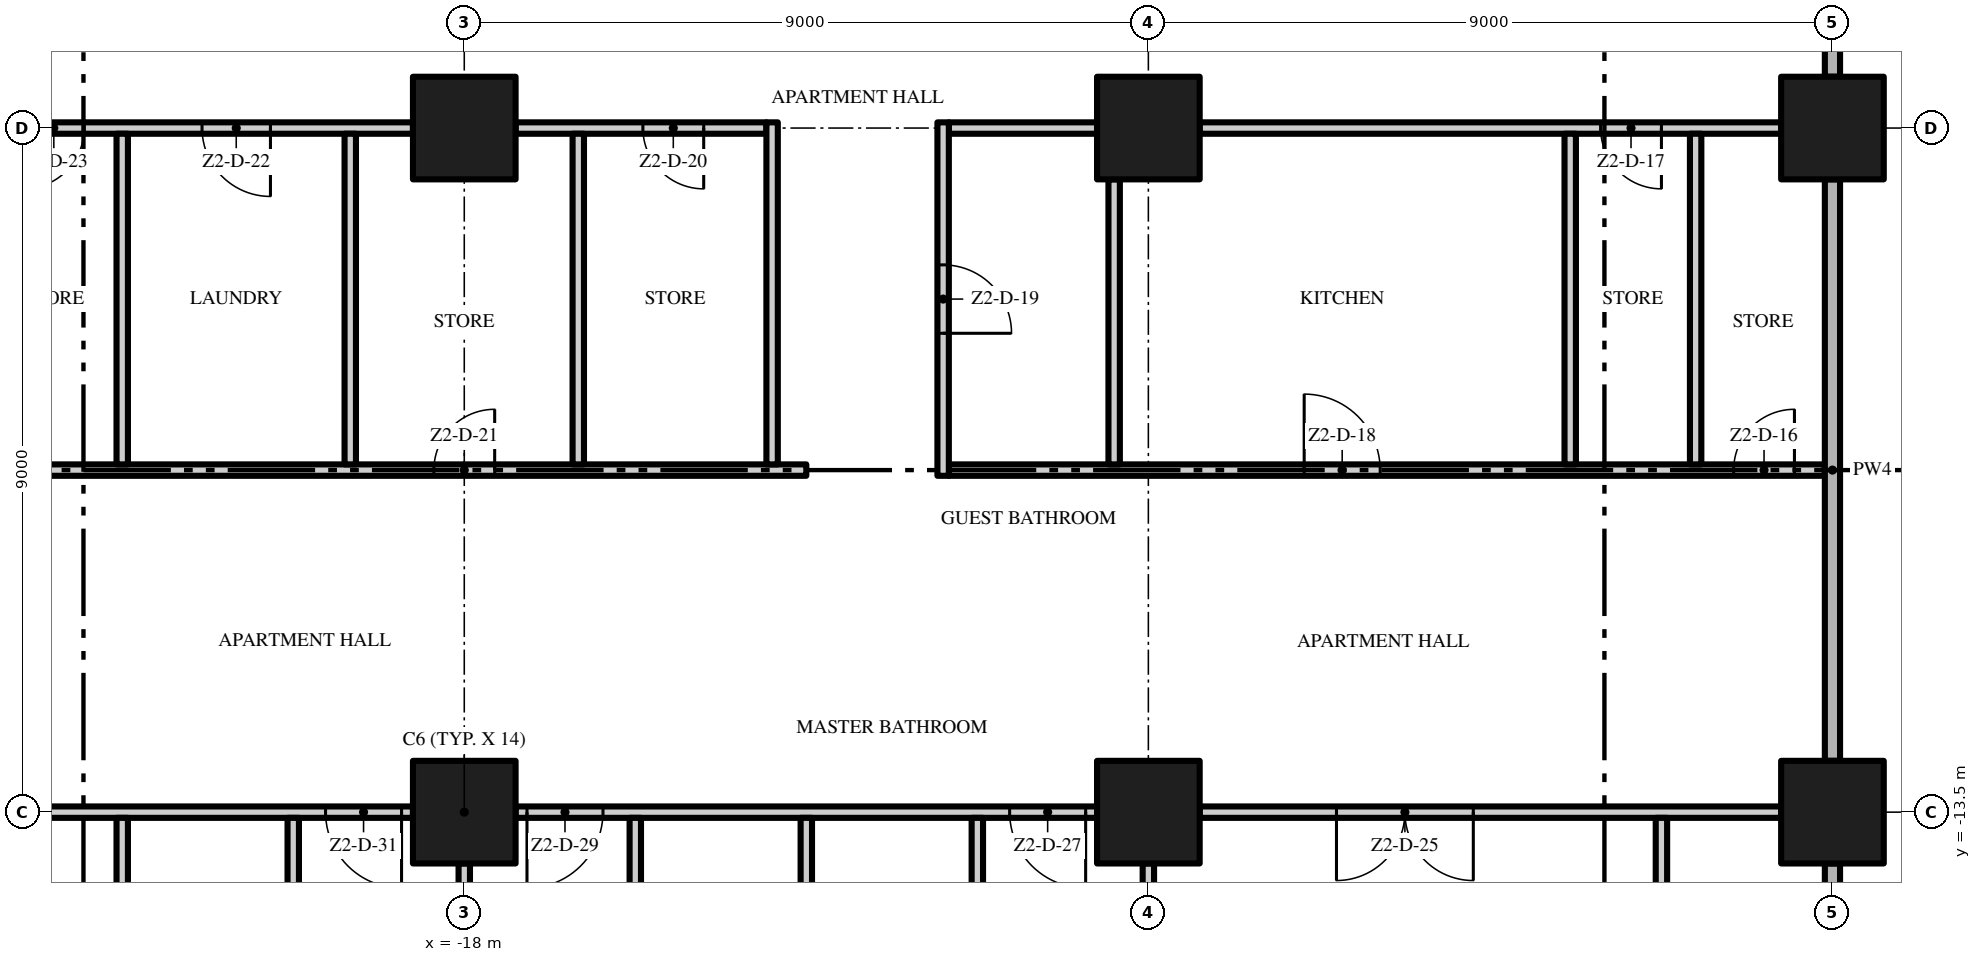
"""IFC4 building model, lengths in metres.
Left out: names, types, materials, properties, quantities, classifications, styles, units other than length and angle.
Written with IfcOpenShell. Run it as: python <this file> out.ifc"""

import sys

from ifc_helpers import new_model, si_unit, direction, frame, frame_2d, origin, origin_2d, place, context, subcontext, project, spatial, rectangle, extrude, element, fill, save


model = new_model("IFC4")
c1 = context("Model", 3, precision=1e-05, world=origin(), true_north=direction((0.0, 1.0)))
c2 = subcontext(c1, "Body", "Model", "MODEL_VIEW")
j1 = project(units=[si_unit("LENGTHUNIT", "METRE"), si_unit("PLANEANGLEUNIT", "RADIAN")], contexts=[c1])
p1 = place(None, origin())
s1 = spatial("IfcSite", under=j1, at=p1, CompositionType="ELEMENT")
p2 = place(p1, origin())
s2 = spatial("IfcBuilding", under=s1, at=p2, CompositionType="ELEMENT")
p3 = place(p2, frame((0.0, 0.0, 111.2)))
s3 = spatial("IfcBuildingStorey", under=s2, at=p3, CompositionType="ELEMENT", Elevation=111.2)
for number, where, z_axis, x_axis in (
    (1, (-18.0, -13.5, 0.0), (0.0, 0.0, 1.0), (1.0, 0.0, 0.0)),
    (2, (-18.0, -4.5, 0.0), (0.0, 0.0, 1.0), (1.0, 0.0, 0.0)),
    (3, (-9.0, -13.5, 0.0), (0.0, 0.0, 1.0), (1.0, 0.0, 0.0)),
    (4, (-9.0, -4.5, 0.0), (0.0, 0.0, 1.0), (1.0, 0.0, 0.0)),
    (5, (0.0, -13.5, 0.0), (0.0, 0.0, 1.0), (1.0, 0.0, 0.0)),
    (6, (0.0, -4.5, 0.0), (0.0, 0.0, 1.0), (1.0, 0.0, 0.0)),
):
    element("IfcColumn", number, at=place(p3, frame(where, z_axis=z_axis, x_axis=x_axis)), inside=s3, PredefinedType="COLUMN", context=c2, shape_type="SweptSolid", body=[
        extrude(rectangle(XDim=1.35, YDim=1.35, at=origin_2d()), origin(), (0.0, 0.0, 1.0), 3.5),
    ])
p4 = place(p3, frame((-18.675, -13.5, 0.0), z_axis=(0.0, 0.0, 1.0), x_axis=(-1.0, 0.0, 0.0)))
e7 = element("IfcWall", 7, at=p4, inside=s3, PredefinedType="PARTITIONING", context=c2, shape_type="SweptSolid", body=[
    extrude(rectangle(XDim=7.075, YDim=0.15, at=frame_2d((3.538, 0.0))), origin(), (0.0, 0.0, 1.0), 3.5),
])
p5 = place(p4, frame((0.15, 0.0, 0.0)))
e8 = element("IfcOpeningElement", 8, at=p5, cuts=e7, PredefinedType="OPENING", context=c2, shape_type="SweptSolid", body=[
    extrude(rectangle(XDim=1.0, YDim=2.4, at=frame_2d((0.5, 1.2))), frame((0.0, 0.085, 0.0), z_axis=(0.0, -1.0, 0.0), x_axis=(1.0, 0.0, 0.0)), (0.0, 0.0, 1.0), 0.17),
])
p6 = place(p4, frame((5.325, 0.0, 0.0)))
e9 = element("IfcOpeningElement", 9, at=p6, cuts=e7, PredefinedType="OPENING", context=c2, shape_type="SweptSolid", body=[
    extrude(rectangle(XDim=1.5, YDim=2.4, at=frame_2d((0.75, 1.2))), frame((0.0, 0.085, 0.0), z_axis=(0.0, -1.0, 0.0), x_axis=(1.0, 0.0, 0.0)), (0.0, 0.0, 1.0), 0.17),
])
p7 = place(p3, frame((-9.675, -13.5, 0.0), z_axis=(0.0, 0.0, 1.0), x_axis=(-1.0, 0.0, 0.0)))
e10 = element("IfcWall", 10, at=p7, inside=s3, PredefinedType="PARTITIONING", context=c2, shape_type="SweptSolid", body=[
    extrude(rectangle(XDim=7.65, YDim=0.15, at=frame_2d((3.825, 0.0))), origin(), (0.0, 0.0, 1.0), 3.5),
])
p8 = place(p7, frame((0.15, 0.0, 0.0)))
e11 = element("IfcOpeningElement", 11, at=p8, cuts=e10, PredefinedType="OPENING", context=c2, shape_type="SweptSolid", body=[
    extrude(rectangle(XDim=1.0, YDim=2.4, at=frame_2d((0.5, 1.2))), frame((0.0, 0.085, 0.0), z_axis=(0.0, -1.0, 0.0), x_axis=(1.0, 0.0, 0.0)), (0.0, 0.0, 1.0), 0.17),
])
p9 = place(p7, frame((6.5, 0.0, 0.0)))
e12 = element("IfcOpeningElement", 12, at=p9, cuts=e10, PredefinedType="OPENING", context=c2, shape_type="SweptSolid", body=[
    extrude(rectangle(XDim=1.0, YDim=2.4, at=frame_2d((0.5, 1.2))), frame((0.0, 0.085, 0.0), z_axis=(0.0, -1.0, 0.0), x_axis=(1.0, 0.0, 0.0)), (0.0, 0.0, 1.0), 0.17),
])
p10 = place(p3, frame((-0.675, -13.5, 0.0), z_axis=(0.0, 0.0, 1.0), x_axis=(-1.0, 0.0, 0.0)))
e13 = element("IfcWall", 13, at=p10, inside=s3, PredefinedType="PARTITIONING", context=c2, shape_type="SweptSolid", body=[
    extrude(rectangle(XDim=7.65, YDim=0.15, at=frame_2d((3.825, 0.0))), origin(), (0.0, 0.0, 1.0), 3.5),
])
p11 = place(p10, frame((4.05, 0.0, 0.0)))
e14 = element("IfcOpeningElement", 14, at=p11, cuts=e13, PredefinedType="OPENING", context=c2, shape_type="SweptSolid", body=[
    extrude(rectangle(XDim=1.8, YDim=2.4, at=frame_2d((0.9, 1.2))), frame((0.0, 0.085, 0.0), z_axis=(0.0, -1.0, 0.0), x_axis=(1.0, 0.0, 0.0)), (0.0, 0.0, 1.0), 0.17),
])
p12 = place(p3, frame((-26.7, -9.0, 0.0), z_axis=(0.0, 0.0, 1.0), x_axis=(1.0, 0.0, 0.0)))
e15 = element("IfcWall", 15, at=p12, inside=s3, PredefinedType="PARTITIONING", context=c2, shape_type="SweptSolid", body=[
    extrude(rectangle(XDim=13.2, YDim=0.15, at=frame_2d((6.6, 0.0))), origin(), (0.0, 0.0, 1.0), 3.5),
])
p13 = place(p12, frame((8.3, 0.0, 0.0)))
e16 = element("IfcOpeningElement", 16, at=p13, cuts=e15, PredefinedType="OPENING", context=c2, shape_type="SweptSolid", body=[
    extrude(rectangle(XDim=0.8, YDim=2.0, at=frame_2d((0.4, 1.0))), frame((0.0, 0.085, 0.0), z_axis=(0.0, -1.0, 0.0), x_axis=(1.0, 0.0, 0.0)), (0.0, 0.0, 1.0), 0.17),
])
p14 = place(p3, frame((-11.625, -9.0, 0.0), z_axis=(0.0, 0.0, 1.0), x_axis=(1.0, 0.0, 0.0)))
e17 = element("IfcWall", 17, at=p14, inside=s3, PredefinedType="PARTITIONING", context=c2, shape_type="SweptSolid", body=[
    extrude(rectangle(XDim=11.525, YDim=0.15, at=frame_2d((5.763, 0.0))), origin(), (0.0, 0.0, 1.0), 3.5),
])
p15 = place(p14, frame((10.325, 0.0, 0.0)))
e18 = element("IfcOpeningElement", 18, at=p15, cuts=e17, PredefinedType="OPENING", context=c2, shape_type="SweptSolid", body=[
    extrude(rectangle(XDim=0.8, YDim=2.0, at=frame_2d((0.4, 1.0))), frame((0.0, 0.085, 0.0), z_axis=(0.0, -1.0, 0.0), x_axis=(1.0, 0.0, 0.0)), (0.0, 0.0, 1.0), 0.17),
])
p16 = place(p14, frame((4.675, 0.0, 0.0)))
e19 = element("IfcOpeningElement", 19, at=p16, cuts=e17, PredefinedType="OPENING", context=c2, shape_type="SweptSolid", body=[
    extrude(rectangle(XDim=1.0, YDim=2.4, at=frame_2d((0.5, 1.2))), frame((0.0, 0.085, 0.0), z_axis=(0.0, -1.0, 0.0), x_axis=(1.0, 0.0, 0.0)), (0.0, 0.0, 1.0), 0.17),
])
p17 = place(p3, frame((-18.675, -4.5, 0.0), z_axis=(0.0, 0.0, 1.0), x_axis=(-1.0, 0.0, 0.0)))
e20 = element("IfcWall", 20, at=p17, inside=s3, PredefinedType="PARTITIONING", context=c2, shape_type="SweptSolid", body=[
    extrude(rectangle(XDim=7.075, YDim=0.15, at=frame_2d((3.538, 0.0))), origin(), (0.0, 0.0, 1.0), 3.5),
])
p18 = place(p17, frame((1.875, 0.0, 0.0)))
e21 = element("IfcOpeningElement", 21, at=p18, cuts=e20, PredefinedType="OPENING", context=c2, shape_type="SweptSolid", body=[
    extrude(rectangle(XDim=0.9, YDim=2.1, at=frame_2d((0.45, 1.05))), frame((0.0, 0.085, 0.0), z_axis=(0.0, -1.0, 0.0), x_axis=(1.0, 0.0, 0.0)), (0.0, 0.0, 1.0), 0.17),
])
p19 = place(p17, frame((4.325, 0.0, 0.0)))
e22 = element("IfcOpeningElement", 22, at=p19, cuts=e20, PredefinedType="OPENING", context=c2, shape_type="SweptSolid", body=[
    extrude(rectangle(XDim=0.8, YDim=2.0, at=frame_2d((0.4, 1.0))), frame((0.0, 0.085, 0.0), z_axis=(0.0, -1.0, 0.0), x_axis=(1.0, 0.0, 0.0)), (0.0, 0.0, 1.0), 0.17),
])
p20 = place(p17, frame((6.125, 0.0, 0.0)))
e23 = element("IfcOpeningElement", 23, at=p20, cuts=e20, PredefinedType="OPENING", context=c2, shape_type="SweptSolid", body=[
    extrude(rectangle(XDim=0.8, YDim=2.0, at=frame_2d((0.4, 1.0))), frame((0.0, 0.085, 0.0), z_axis=(0.0, -1.0, 0.0), x_axis=(1.0, 0.0, 0.0)), (0.0, 0.0, 1.0), 0.17),
])
p21 = place(p3, frame((-14.025, -4.5, 0.0), z_axis=(0.0, 0.0, 1.0), x_axis=(-1.0, 0.0, 0.0)))
e24 = element("IfcWall", 24, at=p21, inside=s3, PredefinedType="PARTITIONING", context=c2, shape_type="SweptSolid", body=[
    extrude(rectangle(XDim=3.3, YDim=0.15, at=frame_2d((1.65, 0.0))), origin(), (0.0, 0.0, 1.0), 3.5),
])
p22 = place(p21, frame((0.825, 0.0, 0.0)))
e25 = element("IfcOpeningElement", 25, at=p22, cuts=e24, PredefinedType="OPENING", context=c2, shape_type="SweptSolid", body=[
    extrude(rectangle(XDim=0.8, YDim=2.0, at=frame_2d((0.4, 1.0))), frame((0.0, 0.085, 0.0), z_axis=(0.0, -1.0, 0.0), x_axis=(1.0, 0.0, 0.0)), (0.0, 0.0, 1.0), 0.17),
])
p23 = place(p3, frame((-11.625, -4.5, 0.0), z_axis=(0.0, 0.0, 1.0), x_axis=(1.0, 0.0, 0.0)))
e26 = element("IfcWall", 26, at=p23, inside=s3, PredefinedType="PARTITIONING", context=c2, shape_type="SweptSolid", body=[
    extrude(rectangle(XDim=1.95, YDim=0.15, at=frame_2d((0.975, 0.0))), origin(), (0.0, 0.0, 1.0), 3.5),
])
p24 = place(p3, frame((-0.675, -4.5, 0.0), z_axis=(0.0, 0.0, 1.0), x_axis=(-1.0, 0.0, 0.0)))
e27 = element("IfcWall", 27, at=p24, inside=s3, PredefinedType="PARTITIONING", context=c2, shape_type="SweptSolid", body=[
    extrude(rectangle(XDim=7.65, YDim=0.15, at=frame_2d((3.825, 0.0))), origin(), (0.0, 0.0, 1.0), 3.5),
])
p25 = place(p24, frame((1.575, 0.0, 0.0)))
e28 = element("IfcOpeningElement", 28, at=p25, cuts=e27, PredefinedType="OPENING", context=c2, shape_type="SweptSolid", body=[
    extrude(rectangle(XDim=0.8, YDim=2.0, at=frame_2d((0.4, 1.0))), frame((0.0, 0.085, 0.0), z_axis=(0.0, -1.0, 0.0), x_axis=(1.0, 0.0, 0.0)), (0.0, 0.0, 1.0), 0.17),
])
p26 = place(p3, frame((-22.5, -17.375, 0.0), z_axis=(0.0, 0.0, 1.0), x_axis=(0.0, 1.0, 0.0)))
e29 = element("IfcWall", 29, at=p26, inside=s3, PredefinedType="PARTITIONING", context=c2, shape_type="SweptSolid", body=[
    extrude(rectangle(XDim=3.8, YDim=0.15, at=frame_2d((1.9, 0.0))), origin(), (0.0, 0.0, 1.0), 3.5),
])
p27 = place(p3, frame((-22.5, -8.925, 0.0), z_axis=(0.0, 0.0, 1.0), x_axis=(0.0, 1.0, 0.0)))
e30 = element("IfcWall", 30, at=p27, inside=s3, PredefinedType="PARTITIONING", context=c2, shape_type="SweptSolid", body=[
    extrude(rectangle(XDim=4.35, YDim=0.15, at=frame_2d((2.175, 0.0))), origin(), (0.0, 0.0, 1.0), 3.5),
])
p28 = place(p3, frame((-20.25, -16.575, 0.0), z_axis=(0.0, 0.0, 1.0), x_axis=(0.0, 1.0, 0.0)))
e31 = element("IfcWall", 31, at=p28, inside=s3, PredefinedType="PARTITIONING", context=c2, shape_type="SweptSolid", body=[
    extrude(rectangle(XDim=3.0, YDim=0.15, at=frame_2d((1.5, 0.0))), origin(), (0.0, 0.0, 1.0), 3.5),
])
p29 = place(p3, frame((-19.5, -8.925, 0.0), z_axis=(0.0, 0.0, 1.0), x_axis=(0.0, 1.0, 0.0)))
e32 = element("IfcWall", 32, at=p29, inside=s3, PredefinedType="PARTITIONING", context=c2, shape_type="SweptSolid", body=[
    extrude(rectangle(XDim=4.35, YDim=0.15, at=frame_2d((2.175, 0.0))), origin(), (0.0, 0.0, 1.0), 3.5),
])
p30 = place(p3, frame((-18.0, -21.25, 0.0), z_axis=(0.0, 0.0, 1.0), x_axis=(0.0, 1.0, 0.0)))
e33 = element("IfcWall", 33, at=p30, inside=s3, PredefinedType="PARTITIONING", context=c2, shape_type="SweptSolid", body=[
    extrude(rectangle(XDim=7.075, YDim=0.15, at=frame_2d((3.538, 0.0))), origin(), (0.0, 0.0, 1.0), 3.5),
])
p31 = place(p3, frame((-16.5, -8.925, 0.0), z_axis=(0.0, 0.0, 1.0), x_axis=(0.0, 1.0, 0.0)))
e34 = element("IfcWall", 34, at=p31, inside=s3, PredefinedType="PARTITIONING", context=c2, shape_type="SweptSolid", body=[
    extrude(rectangle(XDim=4.35, YDim=0.15, at=frame_2d((2.175, 0.0))), origin(), (0.0, 0.0, 1.0), 3.5),
])
p32 = place(p3, frame((-15.75, -16.575, 0.0), z_axis=(0.0, 0.0, 1.0), x_axis=(0.0, 1.0, 0.0)))
e35 = element("IfcWall", 35, at=p32, inside=s3, PredefinedType="PARTITIONING", context=c2, shape_type="SweptSolid", body=[
    extrude(rectangle(XDim=3.0, YDim=0.15, at=frame_2d((1.5, 0.0))), origin(), (0.0, 0.0, 1.0), 3.5),
])
p33 = place(p3, frame((-13.95, -8.925, 0.0), z_axis=(0.0, 0.0, 1.0), x_axis=(0.0, 1.0, 0.0)))
e36 = element("IfcWall", 36, at=p33, inside=s3, PredefinedType="PARTITIONING", context=c2, shape_type="SweptSolid", body=[
    extrude(rectangle(XDim=4.5, YDim=0.15, at=frame_2d((2.25, 0.0))), origin(), (0.0, 0.0, 1.0), 3.5),
])
p34 = place(p3, frame((-13.5, -22.2, 0.0), z_axis=(0.0, 0.0, 1.0), x_axis=(0.0, 1.0, 0.0)))
e37 = element("IfcWall", 37, at=p34, inside=s3, PredefinedType="PARTITIONING", context=c2, shape_type="SweptSolid", body=[
    extrude(rectangle(XDim=8.625, YDim=0.15, at=frame_2d((4.312, 0.0))), origin(), (0.0, 0.0, 1.0), 3.5),
])
p35 = place(p3, frame((-11.7, -4.425, 0.0), z_axis=(0.0, 0.0, 1.0), x_axis=(0.0, -1.0, 0.0)))
e38 = element("IfcWall", 38, at=p35, inside=s3, PredefinedType="PARTITIONING", context=c2, shape_type="SweptSolid", body=[
    extrude(rectangle(XDim=4.65, YDim=0.15, at=frame_2d((2.325, 0.0))), origin(), (0.0, 0.0, 1.0), 3.5),
])
p36 = place(p35, frame((1.875, 0.0, 0.0)))
e39 = element("IfcOpeningElement", 39, at=p36, cuts=e38, PredefinedType="OPENING", context=c2, shape_type="SweptSolid", body=[
    extrude(rectangle(XDim=0.9, YDim=2.1, at=frame_2d((0.45, 1.05))), frame((0.0, 0.085, 0.0), z_axis=(0.0, -1.0, 0.0), x_axis=(1.0, 0.0, 0.0)), (0.0, 0.0, 1.0), 0.17),
])
p37 = place(p3, frame((-11.25, -16.575, 0.0), z_axis=(0.0, 0.0, 1.0), x_axis=(0.0, 1.0, 0.0)))
e40 = element("IfcWall", 40, at=p37, inside=s3, PredefinedType="PARTITIONING", context=c2, shape_type="SweptSolid", body=[
    extrude(rectangle(XDim=3.0, YDim=0.15, at=frame_2d((1.5, 0.0))), origin(), (0.0, 0.0, 1.0), 3.5),
])
p38 = place(p3, frame((-9.45, -8.925, 0.0), z_axis=(0.0, 0.0, 1.0), x_axis=(0.0, 1.0, 0.0)))
e41 = element("IfcWall", 41, at=p38, inside=s3, PredefinedType="PARTITIONING", context=c2, shape_type="SweptSolid", body=[
    extrude(rectangle(XDim=3.75, YDim=0.15, at=frame_2d((1.875, 0.0))), origin(), (0.0, 0.0, 1.0), 3.5),
])
p39 = place(p3, frame((-9.0, -21.25, 0.0), z_axis=(0.0, 0.0, 1.0), x_axis=(0.0, 1.0, 0.0)))
e42 = element("IfcWall", 42, at=p39, inside=s3, PredefinedType="PARTITIONING", context=c2, shape_type="SweptSolid", body=[
    extrude(rectangle(XDim=7.075, YDim=0.15, at=frame_2d((3.538, 0.0))), origin(), (0.0, 0.0, 1.0), 3.5),
])
p40 = place(p3, frame((-3.45, -8.925, 0.0), z_axis=(0.0, 0.0, 1.0), x_axis=(0.0, 1.0, 0.0)))
e43 = element("IfcWall", 43, at=p40, inside=s3, PredefinedType="PARTITIONING", context=c2, shape_type="SweptSolid", body=[
    extrude(rectangle(XDim=4.35, YDim=0.15, at=frame_2d((2.175, 0.0))), origin(), (0.0, 0.0, 1.0), 3.5),
])
p41 = place(p3, frame((-2.25, -16.575, 0.0), z_axis=(0.0, 0.0, 1.0), x_axis=(0.0, 1.0, 0.0)))
e44 = element("IfcWall", 44, at=p41, inside=s3, PredefinedType="PARTITIONING", context=c2, shape_type="SweptSolid", body=[
    extrude(rectangle(XDim=3.0, YDim=0.15, at=frame_2d((1.5, 0.0))), origin(), (0.0, 0.0, 1.0), 3.5),
])
p42 = place(p3, frame((-1.8, -8.925, 0.0), z_axis=(0.0, 0.0, 1.0), x_axis=(0.0, 1.0, 0.0)))
e45 = element("IfcWall", 45, at=p42, inside=s3, PredefinedType="PARTITIONING", context=c2, shape_type="SweptSolid", body=[
    extrude(rectangle(XDim=4.35, YDim=0.15, at=frame_2d((2.175, 0.0))), origin(), (0.0, 0.0, 1.0), 3.5),
])
p43 = place(p3, frame((0.0, -21.25, 0.0), z_axis=(0.0, 0.0, 1.0), x_axis=(0.0, 1.0, 0.0)))
e46 = element("IfcWall", 46, at=p43, inside=s3, PredefinedType="PARTITIONING", context=c2, shape_type="SweptSolid", body=[
    extrude(rectangle(XDim=7.075, YDim=0.2, at=frame_2d((3.538, 0.0))), origin(), (0.0, 0.0, 1.0), 3.5),
])
p44 = place(p3, frame((0.0, -12.825, 0.0), z_axis=(0.0, 0.0, 1.0), x_axis=(0.0, 1.0, 0.0)))
e47 = element("IfcWall", 47, at=p44, inside=s3, PredefinedType="PARTITIONING", context=c2, shape_type="SweptSolid", body=[
    extrude(rectangle(XDim=7.65, YDim=0.2, at=frame_2d((3.825, 0.0))), origin(), (0.0, 0.0, 1.0), 3.5),
])
p45 = place(p3, frame((0.0, -3.825, 0.0), z_axis=(0.0, 0.0, 1.0), x_axis=(0.0, 1.0, 0.0)))
e48 = element("IfcWall", 48, at=p45, inside=s3, PredefinedType="PARTITIONING", context=c2, shape_type="SweptSolid", body=[
    extrude(rectangle(XDim=3.925, YDim=0.2, at=frame_2d((1.962, 0.0))), origin(), (0.0, 0.0, 1.0), 3.5),
])
p46 = place(p15, origin())
e49 = element("IfcDoor", 49, at=p46, inside=s3, OperationType="SINGLE_SWING_RIGHT", PredefinedType="DOOR", context=c2, shape_type="SweptSolid", body=[
    extrude(rectangle(XDim=0.8, YDim=2.0, at=frame_2d((0.4, 1.0))), frame((0.0, 0.025, 0.0), z_axis=(0.0, -1.0, 0.0), x_axis=(1.0, 0.0, 0.0)), (0.0, 0.0, 1.0), 0.05),
])
fill(e18, e49)
p47 = place(p25, origin())
e50 = element("IfcDoor", 50, at=p47, inside=s3, OperationType="SINGLE_SWING_LEFT", PredefinedType="DOOR", context=c2, shape_type="SweptSolid", body=[
    extrude(rectangle(XDim=0.8, YDim=2.0, at=frame_2d((0.4, 1.0))), frame((0.0, 0.025, 0.0), z_axis=(0.0, -1.0, 0.0), x_axis=(1.0, 0.0, 0.0)), (0.0, 0.0, 1.0), 0.05),
])
fill(e28, e50)
p48 = place(p16, origin())
e51 = element("IfcDoor", 51, at=p48, inside=s3, OperationType="SINGLE_SWING_LEFT", PredefinedType="DOOR", context=c2, shape_type="SweptSolid", body=[
    extrude(rectangle(XDim=1.0, YDim=2.4, at=frame_2d((0.5, 1.2))), frame((0.0, 0.025, 0.0), z_axis=(0.0, -1.0, 0.0), x_axis=(1.0, 0.0, 0.0)), (0.0, 0.0, 1.0), 0.05),
])
fill(e19, e51)
p49 = place(p36, origin())
e52 = element("IfcDoor", 52, at=p49, inside=s3, OperationType="SINGLE_SWING_RIGHT", PredefinedType="DOOR", context=c2, shape_type="SweptSolid", body=[
    extrude(rectangle(XDim=0.9, YDim=2.1, at=frame_2d((0.45, 1.05))), frame((0.0, 0.025, 0.0), z_axis=(0.0, -1.0, 0.0), x_axis=(1.0, 0.0, 0.0)), (0.0, 0.0, 1.0), 0.05),
])
fill(e39, e52)
p50 = place(p22, origin())
e53 = element("IfcDoor", 53, at=p50, inside=s3, OperationType="SINGLE_SWING_LEFT", PredefinedType="DOOR", context=c2, shape_type="SweptSolid", body=[
    extrude(rectangle(XDim=0.8, YDim=2.0, at=frame_2d((0.4, 1.0))), frame((0.0, 0.025, 0.0), z_axis=(0.0, -1.0, 0.0), x_axis=(1.0, 0.0, 0.0)), (0.0, 0.0, 1.0), 0.05),
])
fill(e25, e53)
p51 = place(p13, origin())
e54 = element("IfcDoor", 54, at=p51, inside=s3, OperationType="SINGLE_SWING_RIGHT", PredefinedType="DOOR", context=c2, shape_type="SweptSolid", body=[
    extrude(rectangle(XDim=0.8, YDim=2.0, at=frame_2d((0.4, 1.0))), frame((0.0, 0.025, 0.0), z_axis=(0.0, -1.0, 0.0), x_axis=(1.0, 0.0, 0.0)), (0.0, 0.0, 1.0), 0.05),
])
fill(e16, e54)
p52 = place(p18, origin())
e55 = element("IfcDoor", 55, at=p52, inside=s3, OperationType="SINGLE_SWING_LEFT", PredefinedType="DOOR", context=c2, shape_type="SweptSolid", body=[
    extrude(rectangle(XDim=0.9, YDim=2.1, at=frame_2d((0.45, 1.05))), frame((0.0, 0.025, 0.0), z_axis=(0.0, -1.0, 0.0), x_axis=(1.0, 0.0, 0.0)), (0.0, 0.0, 1.0), 0.05),
])
fill(e21, e55)
p53 = place(p19, origin())
e56 = element("IfcDoor", 56, at=p53, inside=s3, OperationType="SINGLE_SWING_RIGHT", PredefinedType="DOOR", context=c2, shape_type="SweptSolid", body=[
    extrude(rectangle(XDim=0.8, YDim=2.0, at=frame_2d((0.4, 1.0))), frame((0.0, 0.025, 0.0), z_axis=(0.0, -1.0, 0.0), x_axis=(1.0, 0.0, 0.0)), (0.0, 0.0, 1.0), 0.05),
])
fill(e22, e56)
p54 = place(p11, origin())
e57 = element("IfcDoor", 57, at=p54, inside=s3, OperationType="DOUBLE_DOOR_SINGLE_SWING", PredefinedType="DOOR", context=c2, shape_type="SweptSolid", body=[
    extrude(rectangle(XDim=1.8, YDim=2.4, at=frame_2d((0.9, 1.2))), frame((0.0, 0.025, 0.0), z_axis=(0.0, -1.0, 0.0), x_axis=(1.0, 0.0, 0.0)), (0.0, 0.0, 1.0), 0.05),
])
fill(e14, e57)
p55 = place(p8, origin())
e58 = element("IfcDoor", 58, at=p55, inside=s3, OperationType="SINGLE_SWING_LEFT", PredefinedType="DOOR", context=c2, shape_type="SweptSolid", body=[
    extrude(rectangle(XDim=1.0, YDim=2.4, at=frame_2d((0.5, 1.2))), frame((0.0, 0.025, 0.0), z_axis=(0.0, -1.0, 0.0), x_axis=(1.0, 0.0, 0.0)), (0.0, 0.0, 1.0), 0.05),
])
fill(e11, e58)
p56 = place(p9, origin())
e59 = element("IfcDoor", 59, at=p56, inside=s3, OperationType="SINGLE_SWING_RIGHT", PredefinedType="DOOR", context=c2, shape_type="SweptSolid", body=[
    extrude(rectangle(XDim=1.0, YDim=2.4, at=frame_2d((0.5, 1.2))), frame((0.0, 0.025, 0.0), z_axis=(0.0, -1.0, 0.0), x_axis=(1.0, 0.0, 0.0)), (0.0, 0.0, 1.0), 0.05),
])
fill(e12, e59)
p57 = place(p5, origin())
e60 = element("IfcDoor", 60, at=p57, inside=s3, OperationType="SINGLE_SWING_LEFT", PredefinedType="DOOR", context=c2, shape_type="SweptSolid", body=[
    extrude(rectangle(XDim=1.0, YDim=2.4, at=frame_2d((0.5, 1.2))), frame((0.0, 0.025, 0.0), z_axis=(0.0, -1.0, 0.0), x_axis=(1.0, 0.0, 0.0)), (0.0, 0.0, 1.0), 0.05),
])
fill(e8, e60)
save(model, sys.argv[1])
